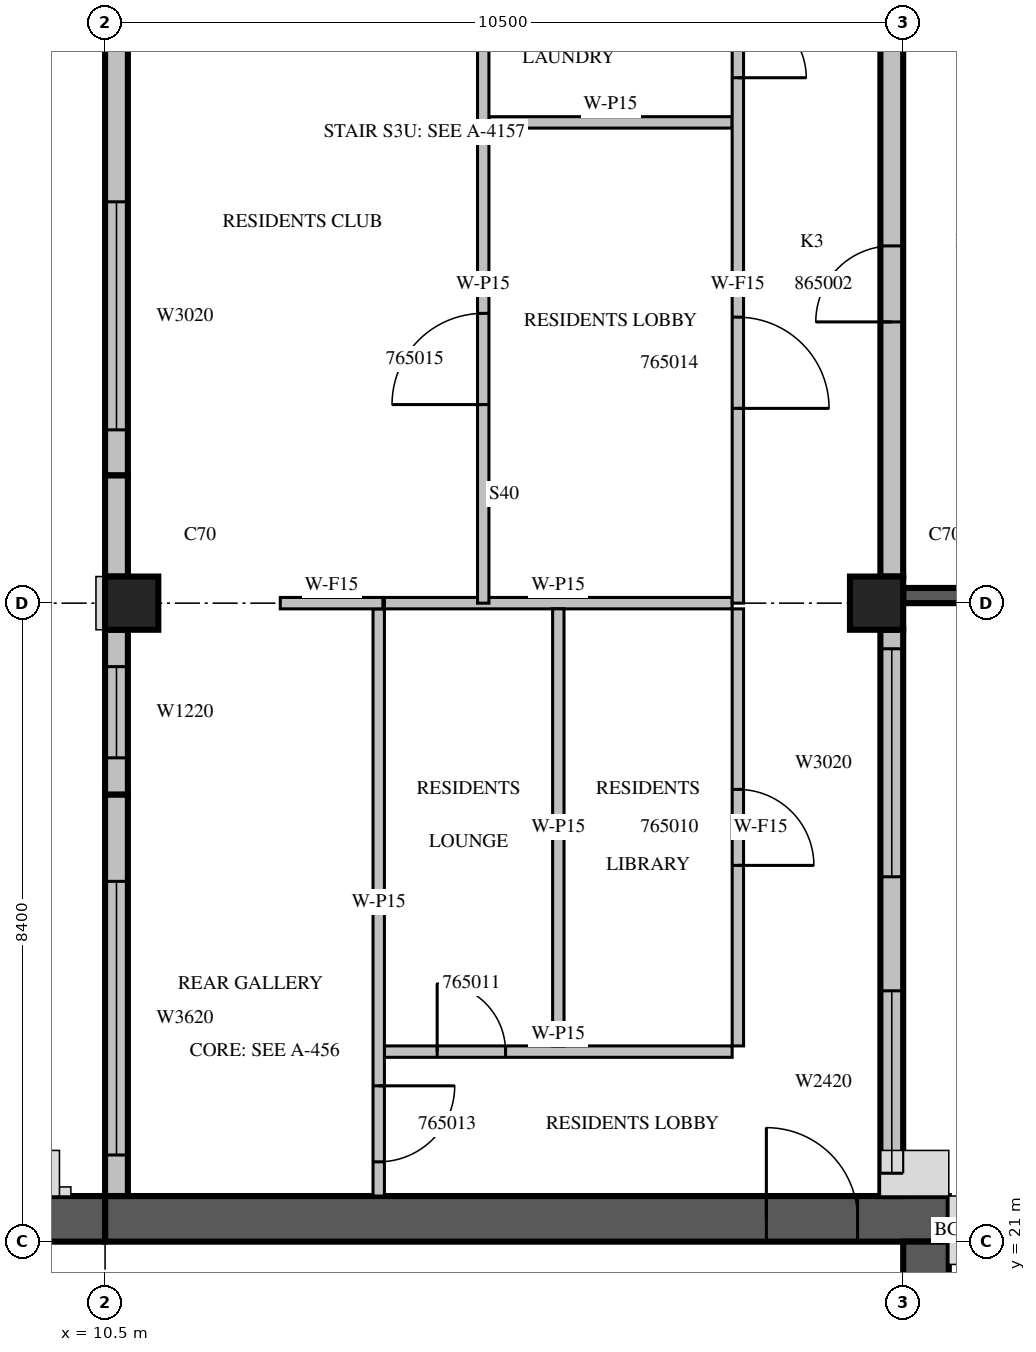
"""IFC4 building model, lengths in metres.
Left out: names, types, materials, properties, quantities, classifications, styles, units other than length and angle.
Written with IfcOpenShell. Run it as: python <this file> out.ifc"""

import sys

from ifc_helpers import new_model, si_unit, direction, frame, frame_2d, origin, origin_2d, place, context, subcontext, project, spatial, rectangle, extrude, source, transform, mapped, element, fill, save


model = new_model("IFC4")
c1 = context("Model", 3, precision=1e-05, world=origin(), true_north=direction((0.0, 1.0)))
c2 = subcontext(c1, "Body", "Model", "MODEL_VIEW")
j1 = project(units=[si_unit("LENGTHUNIT", "METRE"), si_unit("PLANEANGLEUNIT", "RADIAN")], contexts=[c1])
p1 = place(None, origin())
s1 = spatial("IfcSite", under=j1, at=p1, CompositionType="ELEMENT")
p2 = place(p1, origin())
s2 = spatial("IfcBuilding", under=s1, at=p2, CompositionType="ELEMENT")
p3 = place(p2, frame((0.0, 0.0, 288.0)))
s3 = spatial("IfcBuildingStorey", under=s2, at=p3, CompositionType="ELEMENT", Elevation=288.0)
m1 = source(origin(), c2, "Body", "SweptSolid", [
    extrude(rectangle(XDim=0.7, YDim=0.7, at=origin_2d()), origin(), (0.0, 0.0, 1.0), 3.5),
])
for number, where, z_axis, x_axis in (
    (1, (10.85, 29.4, 0.0), (0.0, 0.0, 1.0), (1.0, 0.0, 0.0)),
    (2, (20.65, 29.4, 0.0), (0.0, 0.0, 1.0), (1.0, 0.0, 0.0)),
):
    element("IfcColumn", number, at=place(p3, frame(where, z_axis=z_axis, x_axis=x_axis)), inside=s3, PredefinedType="COLUMN", context=c2, shape_type="MappedRepresentation", body=[
        mapped(m1, transform((0.0, 0.0, 0.0), scale=1.0)),
    ])
m2 = source(origin(), c2, "Body", "SweptSolid", [
    extrude(rectangle(XDim=11.1, YDim=0.6, at=frame_2d((5.55, 0.0))), origin(), (0.0, 0.0, 1.0), 3.5),
])
p4 = place(p3, frame((10.5, 21.3, 0.0), z_axis=(0.0, 0.0, 1.0), x_axis=(1.0, 0.0, 0.0)))
e3 = element("IfcWall", 3, at=p4, inside=s3, PredefinedType="SHEAR", context=c2, shape_type="MappedRepresentation", body=[
    mapped(m2, transform((0.0, 0.0, 0.0), scale=1.0)),
])
m3 = source(origin(), c2, "Body", "SweptSolid", [
    extrude(rectangle(XDim=1.2, YDim=2.1, at=frame_2d((0.6, 1.05))), frame((0.0, 0.31, 0.0), z_axis=(0.0, -1.0, 0.0), x_axis=(1.0, 0.0, 0.0)), (0.0, 0.0, 1.0), 0.62),
])
p5 = place(p4, frame((8.7, 0.0, 0.0)))
e4 = element("IfcOpeningElement", 4, at=p5, cuts=e3, PredefinedType="OPENING", context=c2, shape_type="MappedRepresentation", body=[
    mapped(m3, transform((0.0, 0.0, 0.0), scale=1.0)),
])
m4 = source(origin(), c2, "Body", "SweptSolid", [
    extrude(rectangle(XDim=10.5, YDim=0.6, at=frame_2d((5.25, 0.0))), origin(), (0.0, 0.0, 1.0), 3.5),
])
p6 = place(p3, frame((21.3, 10.5, 0.0), z_axis=(0.0, 0.0, 1.0), x_axis=(0.0, 1.0, 0.0)))
e5 = element("IfcWall", 5, at=p6, inside=s3, PredefinedType="SHEAR", context=c2, shape_type="MappedRepresentation", body=[
    mapped(m4, transform((0.0, 0.0, 0.0), scale=1.0)),
])
m5 = source(origin(), c2, "Body", "SweptSolid", [
    extrude(rectangle(XDim=1.2, YDim=2.4, at=frame_2d((0.6, 1.2))), frame((0.0, 0.31, 0.0), z_axis=(0.0, -1.0, 0.0), x_axis=(1.0, 0.0, 0.0)), (0.0, 0.0, 1.0), 0.62),
])
p7 = place(p6, frame((5.7, 0.0, 0.6)))
e6 = element("IfcOpeningElement", 6, at=p7, cuts=e5, PredefinedType="OPENING", context=c2, shape_type="MappedRepresentation", body=[
    mapped(m5, transform((0.0, 0.0, 0.0), scale=1.0)),
])
m6 = source(origin(), c2, "Body", "SweptSolid", [
    extrude(rectangle(XDim=6.6, YDim=0.6, at=frame_2d((3.3, 0.0))), origin(), (0.0, 0.0, 1.0), 3.5),
])
p8 = place(p3, frame((3.9, 21.3, 0.0), z_axis=(0.0, 0.0, 1.0), x_axis=(1.0, 0.0, 0.0)))
e7 = element("IfcWall", 7, at=p8, inside=s3, PredefinedType="SHEAR", context=c2, shape_type="MappedRepresentation", body=[
    mapped(m6, transform((0.0, 0.0, 0.0), scale=1.0)),
])
p9 = place(p8, frame((1.5, 0.0, 0.6)))
e8 = element("IfcOpeningElement", 8, at=p9, cuts=e7, PredefinedType="OPENING", context=c2, shape_type="MappedRepresentation", body=[
    mapped(m5, transform((0.0, 0.0, 0.0), scale=1.0)),
])
p10 = place(p8, frame((3.6, 0.0, 0.6)))
e9 = element("IfcOpeningElement", 9, at=p10, cuts=e7, PredefinedType="OPENING", context=c2, shape_type="MappedRepresentation", body=[
    mapped(m5, transform((0.0, 0.0, 0.0), scale=1.0)),
])
m7 = source(origin(), c2, "Body", "SweptSolid", [
    extrude(rectangle(XDim=7.45, YDim=0.3, at=frame_2d((3.725, 0.0))), origin(), (0.0, 0.0, 1.0), 3.1),
])
p11 = place(p3, frame((20.85, 21.6, 0.0), z_axis=(0.0, 0.0, 1.0), x_axis=(0.0, 1.0, 0.0)))
e10 = element("IfcWall", 10, at=p11, inside=s3, PredefinedType="STANDARD", context=c2, shape_type="MappedRepresentation", body=[
    mapped(m7, transform((0.0, 0.0, 0.0), scale=1.0)),
])
m8 = source(origin(), c2, "Body", "SweptSolid", [
    extrude(rectangle(XDim=2.4, YDim=2.0, at=frame_2d((1.2, 1.0))), frame((0.0, 0.16, 0.0), z_axis=(0.0, -1.0, 0.0), x_axis=(1.0, 0.0, 0.0)), (0.0, 0.0, 1.0), 0.32),
])
p12 = place(p11, frame((0.3, 0.0, 0.6)))
e11 = element("IfcOpeningElement", 11, at=p12, cuts=e10, PredefinedType="OPENING", context=c2, shape_type="MappedRepresentation", body=[
    mapped(m8, transform((0.0, 0.0, 0.0), scale=1.0)),
])
m9 = source(origin(), c2, "Body", "SweptSolid", [
    extrude(rectangle(XDim=3.0, YDim=2.0, at=frame_2d((1.5, 1.0))), frame((0.0, 0.16, 0.0), z_axis=(0.0, -1.0, 0.0), x_axis=(1.0, 0.0, 0.0)), (0.0, 0.0, 1.0), 0.32),
])
p13 = place(p11, frame((4.2, 0.0, 0.6)))
e12 = element("IfcOpeningElement", 12, at=p13, cuts=e10, PredefinedType="OPENING", context=c2, shape_type="MappedRepresentation", body=[
    mapped(m9, transform((0.0, 0.0, 0.0), scale=1.0)),
])
m10 = source(origin(), c2, "Body", "SweptSolid", [
    extrude(rectangle(XDim=7.7, YDim=0.3, at=frame_2d((3.85, 0.0))), origin(), (0.0, 0.0, 1.0), 3.1),
])
p14 = place(p3, frame((20.85, 29.75, 0.0), z_axis=(0.0, 0.0, 1.0), x_axis=(0.0, 1.0, 0.0)))
e13 = element("IfcWall", 13, at=p14, inside=s3, PredefinedType="STANDARD", context=c2, shape_type="MappedRepresentation", body=[
    mapped(m10, transform((0.0, 0.0, 0.0), scale=1.0)),
])
m11 = source(origin(), c2, "Body", "SweptSolid", [
    extrude(rectangle(XDim=1.0, YDim=2.1, at=frame_2d((0.5, 1.05))), frame((0.0, 0.16, 0.0), z_axis=(0.0, -1.0, 0.0), x_axis=(1.0, 0.0, 0.0)), (0.0, 0.0, 1.0), 0.32),
])
p15 = place(p14, frame((3.35, 0.0, 0.0)))
e14 = element("IfcOpeningElement", 14, at=p15, cuts=e13, PredefinedType="OPENING", context=c2, shape_type="MappedRepresentation", body=[
    mapped(m11, transform((0.0, 0.0, 0.0), scale=1.0)),
])
p16 = place(p3, frame((10.65, 37.45, 0.0), z_axis=(0.0, 0.0, 1.0), x_axis=(0.0, -1.0, 0.0)))
e15 = element("IfcWall", 15, at=p16, inside=s3, PredefinedType="STANDARD", context=c2, shape_type="SweptSolid", body=[
    extrude(rectangle(XDim=6.37, YDim=0.3, at=frame_2d((3.185, 0.0))), origin(), (0.0, 0.0, 1.0), 3.1),
])
p17 = place(p16, frame((2.77, 0.0, 0.6)))
e16 = element("IfcOpeningElement", 16, at=p17, cuts=e15, PredefinedType="OPENING", context=c2, shape_type="MappedRepresentation", body=[
    mapped(m9, transform((0.0, 0.0, 0.0), scale=1.0)),
])
p18 = place(p3, frame((10.65, 31.08, 0.0), z_axis=(0.0, 0.0, 1.0), x_axis=(0.0, -1.0, 0.0)))
e17 = element("IfcWall", 17, at=p18, inside=s3, PredefinedType="STANDARD", context=c2, shape_type="SweptSolid", body=[
    extrude(rectangle(XDim=1.33, YDim=0.3, at=frame_2d((0.665, 0.0))), origin(), (0.0, 0.0, 1.0), 3.1),
])
p19 = place(p3, frame((10.65, 29.05, 0.0), z_axis=(0.0, 0.0, 1.0), x_axis=(0.0, -1.0, 0.0)))
e18 = element("IfcWall", 18, at=p19, inside=s3, PredefinedType="STANDARD", context=c2, shape_type="SweptSolid", body=[
    extrude(rectangle(XDim=2.17, YDim=0.3, at=frame_2d((1.085, 0.0))), origin(), (0.0, 0.0, 1.0), 3.1),
])
m12 = source(origin(), c2, "Body", "SweptSolid", [
    extrude(rectangle(XDim=1.2, YDim=2.0, at=frame_2d((0.6, 1.0))), frame((0.0, 0.16, 0.0), z_axis=(0.0, -1.0, 0.0), x_axis=(1.0, 0.0, 0.0)), (0.0, 0.0, 1.0), 0.32),
])
p20 = place(p19, frame((0.485, 0.0, 0.6)))
e19 = element("IfcOpeningElement", 19, at=p20, cuts=e18, PredefinedType="OPENING", context=c2, shape_type="MappedRepresentation", body=[
    mapped(m12, transform((0.0, 0.0, 0.0), scale=1.0)),
])
p21 = place(p3, frame((10.65, 26.88, 0.0), z_axis=(0.0, 0.0, 1.0), x_axis=(0.0, -1.0, 0.0)))
e20 = element("IfcWall", 20, at=p21, inside=s3, PredefinedType="STANDARD", context=c2, shape_type="SweptSolid", body=[
    extrude(rectangle(XDim=5.28, YDim=0.3, at=frame_2d((2.64, 0.0))), origin(), (0.0, 0.0, 1.0), 3.1),
])
m13 = source(origin(), c2, "Body", "SweptSolid", [
    extrude(rectangle(XDim=3.6, YDim=2.0, at=frame_2d((1.8, 1.0))), frame((0.0, 0.16, 0.0), z_axis=(0.0, -1.0, 0.0), x_axis=(1.0, 0.0, 0.0)), (0.0, 0.0, 1.0), 0.32),
])
p22 = place(p21, frame((1.14, 0.0, 0.6)))
e21 = element("IfcOpeningElement", 21, at=p22, cuts=e20, PredefinedType="OPENING", context=c2, shape_type="MappedRepresentation", body=[
    mapped(m13, transform((0.0, 0.0, 0.0), scale=1.0)),
])
m14 = source(origin(), c2, "Body", "SweptSolid", [
    extrude(rectangle(XDim=3.9, YDim=0.2, at=frame_2d((1.95, 0.0))), origin(), (0.0, 0.0, 1.0), 3.09),
])
p23 = place(p3, frame((21.0, 29.5, 0.0), z_axis=(0.0, 0.0, 1.0), x_axis=(1.0, 0.0, 0.0)))
e22 = element("IfcWall", 22, at=p23, inside=s3, PredefinedType="SOLIDWALL", context=c2, shape_type="MappedRepresentation", body=[
    mapped(m14, transform((0.0, 0.0, 0.0), scale=1.0)),
])
m15 = source(origin(), c2, "Body", "SweptSolid", [
    extrude(rectangle(XDim=2.4, YDim=2.0, at=frame_2d((1.2, 1.0))), frame((0.0, 0.11, 0.0), z_axis=(0.0, -1.0, 0.0), x_axis=(1.0, 0.0, 0.0)), (0.0, 0.0, 1.0), 0.22),
])
p24 = place(p23, frame((0.75, 0.0, 0.6)))
e23 = element("IfcOpeningElement", 23, at=p24, cuts=e22, PredefinedType="OPENING", context=c2, shape_type="MappedRepresentation", body=[
    mapped(m15, transform((0.0, 0.0, 0.0), scale=1.0)),
])
m16 = source(origin(), c2, "Body", "SweptSolid", [
    extrude(rectangle(XDim=4.575, YDim=0.15, at=frame_2d((2.288, 0.0))), origin(), (0.0, 0.0, 1.0), 3.1),
])
p25 = place(p3, frame((14.175, 23.5, 0.0), z_axis=(0.0, 0.0, 1.0), x_axis=(1.0, 0.0, 0.0)))
e24 = element("IfcWall", 24, at=p25, inside=s3, PredefinedType="PARTITIONING", context=c2, shape_type="MappedRepresentation", body=[
    mapped(m16, transform((0.0, 0.0, 0.0), scale=1.0)),
])
m17 = source(origin(), c2, "Body", "SweptSolid", [
    extrude(rectangle(XDim=0.9, YDim=2.1, at=frame_2d((0.45, 1.05))), frame((0.0, 0.085, 0.0), z_axis=(0.0, -1.0, 0.0), x_axis=(1.0, 0.0, 0.0)), (0.0, 0.0, 1.0), 0.17),
])
p26 = place(p25, frame((0.694, 0.0, 0.0)))
e25 = element("IfcOpeningElement", 25, at=p26, cuts=e24, PredefinedType="OPENING", context=c2, shape_type="MappedRepresentation", body=[
    mapped(m17, transform((0.0, 0.0, 0.0), scale=1.0)),
])
p27 = place(p3, frame((18.75, 29.4, 0.0), z_axis=(0.0, 0.0, 1.0), x_axis=(-1.0, 0.0, 0.0)))
e26 = element("IfcWall", 26, at=p27, inside=s3, PredefinedType="PARTITIONING", context=c2, shape_type="MappedRepresentation", body=[
    mapped(m16, transform((0.0, 0.0, 0.0), scale=1.0)),
])
m18 = source(origin(), c2, "Body", "SweptSolid", [
    extrude(rectangle(XDim=5.75, YDim=0.15, at=frame_2d((2.875, 0.0))), origin(), (0.0, 0.0, 1.0), 3.1),
])
p28 = place(p3, frame((18.825, 23.575, 0.0), z_axis=(0.0, 0.0, 1.0), x_axis=(0.0, 1.0, 0.0)))
e27 = element("IfcWall", 27, at=p28, inside=s3, PredefinedType="PARTITIONING", context=c2, shape_type="MappedRepresentation", body=[
    mapped(m18, transform((0.0, 0.0, 0.0), scale=1.0)),
])
m19 = source(origin(), c2, "Body", "SweptSolid", [
    extrude(rectangle(XDim=1.0, YDim=2.1, at=frame_2d((0.5, 1.05))), frame((0.0, 0.085, 0.0), z_axis=(0.0, -1.0, 0.0), x_axis=(1.0, 0.0, 0.0)), (0.0, 0.0, 1.0), 0.17),
])
p29 = place(p28, frame((2.375, 0.0, 0.0)))
e28 = element("IfcOpeningElement", 28, at=p29, cuts=e27, PredefinedType="OPENING", context=c2, shape_type="MappedRepresentation", body=[
    mapped(m19, transform((0.0, 0.0, 0.0), scale=1.0)),
])
p30 = place(p3, frame((16.463, 23.575, 0.0), z_axis=(0.0, 0.0, 1.0), x_axis=(0.0, 1.0, 0.0)))
e29 = element("IfcWall", 29, at=p30, inside=s3, PredefinedType="PARTITIONING", context=c2, shape_type="MappedRepresentation", body=[
    mapped(m18, transform((0.0, 0.0, 0.0), scale=1.0)),
])
m20 = source(origin(), c2, "Body", "SweptSolid", [
    extrude(rectangle(XDim=7.725, YDim=0.15, at=frame_2d((3.862, 0.0))), origin(), (0.0, 0.0, 1.0), 3.1),
])
p31 = place(p3, frame((14.1, 29.325, 0.0), z_axis=(0.0, 0.0, 1.0), x_axis=(0.0, -1.0, 0.0)))
e30 = element("IfcWall", 30, at=p31, inside=s3, PredefinedType="PARTITIONING", context=c2, shape_type="MappedRepresentation", body=[
    mapped(m20, transform((0.0, 0.0, 0.0), scale=1.0)),
])
p32 = place(p31, frame((6.275, 0.0, 0.0)))
e31 = element("IfcOpeningElement", 31, at=p32, cuts=e30, PredefinedType="OPENING", context=c2, shape_type="MappedRepresentation", body=[
    mapped(m19, transform((0.0, 0.0, 0.0), scale=1.0)),
])
m21 = source(origin(), c2, "Body", "SweptSolid", [
    extrude(rectangle(XDim=3.2, YDim=0.15, at=frame_2d((1.6, 0.0))), origin(), (0.0, 0.0, 1.0), 3.1),
])
p33 = place(p3, frame((18.75, 35.725, 0.0), z_axis=(0.0, 0.0, 1.0), x_axis=(-1.0, 0.0, 0.0)))
e32 = element("IfcWall", 32, at=p33, inside=s3, PredefinedType="PARTITIONING", context=c2, shape_type="MappedRepresentation", body=[
    mapped(m21, transform((0.0, 0.0, 0.0), scale=1.0)),
])
p34 = place(p3, frame((14.155, 29.4, 0.0), z_axis=(0.0, 0.0, 1.0), x_axis=(-1.0, 0.0, 0.0)))
e33 = element("IfcWall", 33, at=p34, inside=s3, PredefinedType="PARTITIONING", context=c2, shape_type="SweptSolid", body=[
    extrude(rectangle(XDim=1.35, YDim=0.15, at=frame_2d((0.675, 0.0))), origin(), (0.0, 0.0, 1.0), 3.1),
])
m22 = source(origin(), c2, "Body", "SweptSolid", [
    extrude(rectangle(XDim=8.4, YDim=0.15, at=frame_2d((4.2, 0.0))), origin(), (0.0, 0.0, 1.0), 3.1),
])
p35 = place(p3, frame((15.475, 29.4, 0.0), z_axis=(0.0, 0.0, 1.0), x_axis=(0.0, 1.0, 0.0)))
e34 = element("IfcWall", 34, at=p35, inside=s3, PredefinedType="PARTITIONING", context=c2, shape_type="MappedRepresentation", body=[
    mapped(m22, transform((0.0, 0.0, 0.0), scale=1.0)),
])
m23 = source(origin(), c2, "Body", "SweptSolid", [
    extrude(rectangle(XDim=1.2, YDim=2.1, at=frame_2d((0.6, 1.05))), frame((0.0, 0.085, 0.0), z_axis=(0.0, -1.0, 0.0), x_axis=(1.0, 0.0, 0.0)), (0.0, 0.0, 1.0), 0.17),
])
p36 = place(p35, frame((2.612, 0.0, 0.0)))
e35 = element("IfcOpeningElement", 35, at=p36, cuts=e34, PredefinedType="OPENING", context=c2, shape_type="MappedRepresentation", body=[
    mapped(m23, transform((0.0, 0.0, 0.0), scale=1.0)),
])
p37 = place(p3, frame((18.825, 29.4, 0.0), z_axis=(0.0, 0.0, 1.0), x_axis=(0.0, 1.0, 0.0)))
e36 = element("IfcWall", 36, at=p37, inside=s3, PredefinedType="PARTITIONING", context=c2, shape_type="MappedRepresentation", body=[
    mapped(m22, transform((0.0, 0.0, 0.0), scale=1.0)),
])
p38 = place(p37, frame((2.562, 0.0, 0.0)))
e37 = element("IfcOpeningElement", 37, at=p38, cuts=e36, PredefinedType="OPENING", context=c2, shape_type="MappedRepresentation", body=[
    mapped(m23, transform((0.0, 0.0, 0.0), scale=1.0)),
])
p39 = place(p37, frame((6.912, 0.0, 0.0)))
e38 = element("IfcOpeningElement", 38, at=p39, cuts=e36, PredefinedType="OPENING", context=c2, shape_type="MappedRepresentation", body=[
    mapped(m17, transform((0.0, 0.0, 0.0), scale=1.0)),
])
m24 = source(origin(), c2, "Body", "SweptSolid", [
    extrude(rectangle(XDim=2.4, YDim=2.0, at=frame_2d((1.2, 1.0))), frame((0.0, 0.03, 0.0), z_axis=(0.0, -1.0, 0.0), x_axis=(1.0, 0.0, 0.0)), (0.0, 0.0, 1.0), 0.06),
])
p40 = place(p12, origin())
e39 = element("IfcWindow", 39, at=p40, inside=s3, PartitioningType="SINGLE_PANEL", PredefinedType="WINDOW", context=c2, shape_type="MappedRepresentation", body=[
    mapped(m24, transform((0.0, 0.0, 0.0), scale=1.0)),
])
fill(e11, e39)
m25 = source(origin(), c2, "Body", "SweptSolid", [
    extrude(rectangle(XDim=3.0, YDim=2.0, at=frame_2d((1.5, 1.0))), frame((0.0, 0.03, 0.0), z_axis=(0.0, -1.0, 0.0), x_axis=(1.0, 0.0, 0.0)), (0.0, 0.0, 1.0), 0.06),
])
p41 = place(p13, origin())
e40 = element("IfcWindow", 40, at=p41, inside=s3, PartitioningType="SINGLE_PANEL", PredefinedType="WINDOW", context=c2, shape_type="MappedRepresentation", body=[
    mapped(m25, transform((0.0, 0.0, 0.0), scale=1.0)),
])
fill(e12, e40)
p42 = place(p17, origin())
e41 = element("IfcWindow", 41, at=p42, inside=s3, PartitioningType="SINGLE_PANEL", PredefinedType="WINDOW", context=c2, shape_type="MappedRepresentation", body=[
    mapped(m25, transform((0.0, 0.0, 0.0), scale=1.0)),
])
fill(e16, e41)
m26 = source(origin(), c2, "Body", "SweptSolid", [
    extrude(rectangle(XDim=1.2, YDim=2.0, at=frame_2d((0.6, 1.0))), frame((0.0, 0.03, 0.0), z_axis=(0.0, -1.0, 0.0), x_axis=(1.0, 0.0, 0.0)), (0.0, 0.0, 1.0), 0.06),
])
p43 = place(p20, origin())
e42 = element("IfcWindow", 42, at=p43, inside=s3, PartitioningType="SINGLE_PANEL", PredefinedType="WINDOW", context=c2, shape_type="MappedRepresentation", body=[
    mapped(m26, transform((0.0, 0.0, 0.0), scale=1.0)),
])
fill(e19, e42)
m27 = source(origin(), c2, "Body", "SweptSolid", [
    extrude(rectangle(XDim=3.6, YDim=2.0, at=frame_2d((1.8, 1.0))), frame((0.0, 0.03, 0.0), z_axis=(0.0, -1.0, 0.0), x_axis=(1.0, 0.0, 0.0)), (0.0, 0.0, 1.0), 0.06),
])
p44 = place(p22, origin())
e43 = element("IfcWindow", 43, at=p44, inside=s3, PartitioningType="SINGLE_PANEL", PredefinedType="WINDOW", context=c2, shape_type="MappedRepresentation", body=[
    mapped(m27, transform((0.0, 0.0, 0.0), scale=1.0)),
])
fill(e21, e43)
m28 = source(origin(), c2, "Body", "SweptSolid", [
    extrude(rectangle(XDim=1.2, YDim=2.1, at=frame_2d((0.6, 1.05))), frame((0.0, 0.025, 0.0), z_axis=(0.0, -1.0, 0.0), x_axis=(1.0, 0.0, 0.0)), (0.0, 0.0, 1.0), 0.05),
])
p45 = place(p5, origin())
e44 = element("IfcDoor", 44, at=p45, inside=s3, OperationType="SINGLE_SWING_LEFT", PredefinedType="DOOR", context=c2, shape_type="MappedRepresentation", body=[
    mapped(m28, transform((0.0, 0.0, 0.0), scale=1.0)),
])
fill(e4, e44)
m29 = source(origin(), c2, "Body", "SweptSolid", [
    extrude(rectangle(XDim=1.0, YDim=2.1, at=frame_2d((0.5, 1.05))), frame((0.0, 0.025, 0.0), z_axis=(0.0, -1.0, 0.0), x_axis=(1.0, 0.0, 0.0)), (0.0, 0.0, 1.0), 0.05),
])
p46 = place(p29, origin())
e45 = element("IfcDoor", 45, at=p46, inside=s3, OperationType="SINGLE_SWING_RIGHT", PredefinedType="DOOR", context=c2, shape_type="MappedRepresentation", body=[
    mapped(m29, transform((0.0, 0.0, 0.0), scale=1.0)),
])
fill(e28, e45)
m30 = source(origin(), c2, "Body", "SweptSolid", [
    extrude(rectangle(XDim=0.9, YDim=2.1, at=frame_2d((0.45, 1.05))), frame((0.0, 0.025, 0.0), z_axis=(0.0, -1.0, 0.0), x_axis=(1.0, 0.0, 0.0)), (0.0, 0.0, 1.0), 0.05),
])
p47 = place(p26, origin())
e46 = element("IfcDoor", 46, at=p47, inside=s3, OperationType="SINGLE_SWING_LEFT", PredefinedType="DOOR", context=c2, shape_type="MappedRepresentation", body=[
    mapped(m30, transform((0.0, 0.0, 0.0), scale=1.0)),
])
fill(e25, e46)
p48 = place(p32, origin())
e47 = element("IfcDoor", 47, at=p48, inside=s3, OperationType="SINGLE_SWING_LEFT", PredefinedType="DOOR", context=c2, shape_type="MappedRepresentation", body=[
    mapped(m29, transform((0.0, 0.0, 0.0), scale=1.0)),
])
fill(e31, e47)
p49 = place(p38, origin())
e48 = element("IfcDoor", 48, at=p49, inside=s3, OperationType="SINGLE_SWING_RIGHT", PredefinedType="DOOR", context=c2, shape_type="MappedRepresentation", body=[
    mapped(m28, transform((0.0, 0.0, 0.0), scale=1.0)),
])
fill(e37, e48)
p50 = place(p36, origin())
e49 = element("IfcDoor", 49, at=p50, inside=s3, OperationType="SINGLE_SWING_LEFT", PredefinedType="DOOR", context=c2, shape_type="MappedRepresentation", body=[
    mapped(m28, transform((0.0, 0.0, 0.0), scale=1.0)),
])
fill(e35, e49)
p51 = place(p39, origin())
e50 = element("IfcDoor", 50, at=p51, inside=s3, OperationType="SINGLE_SWING_RIGHT", PredefinedType="DOOR", context=c2, shape_type="MappedRepresentation", body=[
    mapped(m30, transform((0.0, 0.0, 0.0), scale=1.0)),
])
fill(e38, e50)
p52 = place(p15, origin())
e51 = element("IfcDoor", 51, at=p52, inside=s3, OperationType="SINGLE_SWING_LEFT", PredefinedType="DOOR", context=c2, shape_type="MappedRepresentation", body=[
    mapped(m29, transform((0.0, 0.0, 0.0), scale=1.0)),
])
fill(e14, e51)
save(model, sys.argv[1])
